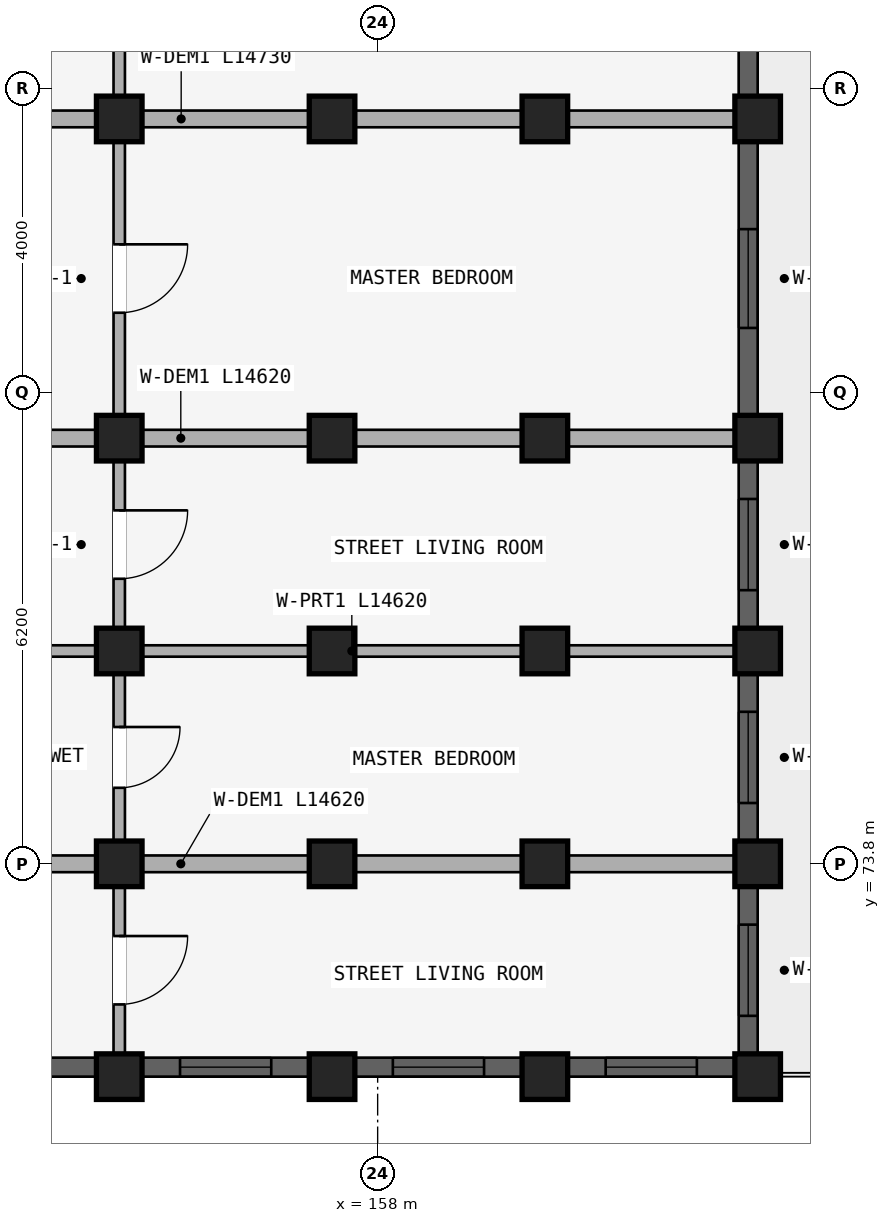
"""IFC4 building model, lengths in metres.
Left out: names, types, materials, properties, quantities, classifications, styles, units other than length and angle.
Written with IfcOpenShell. Run it as: python <this file> out.ifc"""

import sys

from ifc_helpers import new_model, si_unit, direction, frame, frame_2d, origin, origin_2d, place, context, subcontext, project, spatial, rectangle, extrude, element, fill, save


model = new_model("IFC4")
c1 = context("Model", 3, precision=1e-05, world=origin(), true_north=direction((0.0, 1.0)))
c2 = subcontext(c1, "Body", "Model", "MODEL_VIEW")
j1 = project(units=[si_unit("LENGTHUNIT", "METRE"), si_unit("PLANEANGLEUNIT", "RADIAN")], contexts=[c1])
p1 = place(None, origin())
s1 = spatial("IfcSite", under=j1, at=p1, CompositionType="ELEMENT")
p2 = place(p1, origin())
s2 = spatial("IfcBuilding", under=s1, at=p2, CompositionType="ELEMENT")
p3 = place(p2, frame((0.0, 0.0, 30.75)))
s3 = spatial("IfcBuildingStorey", under=s2, at=p3, CompositionType="ELEMENT", Elevation=30.75)
for number, where, z_axis, x_axis in (
    (1, (154.6, 83.6, 0.0), (0.0, 0.0, 1.0), (1.0, 0.0, 0.0)),
    (2, (157.4, 83.6, 0.0), (0.0, 0.0, 1.0), (1.0, 0.0, 0.0)),
    (3, (160.2, 83.6, 0.0), (0.0, 0.0, 1.0), (1.0, 0.0, 0.0)),
):
    element("IfcColumn", number, at=place(p3, frame(where, z_axis=z_axis, x_axis=x_axis)), inside=s3, PredefinedType="COLUMN", context=c2, shape_type="SweptSolid", body=[
        extrude(rectangle(XDim=0.6, YDim=0.6, at=origin_2d()), origin(), (0.0, 0.0, 1.0), 2.93),
    ])
p4 = place(p3, frame((163.0, 83.6, 0.0), z_axis=(0.0, 0.0, 1.0), x_axis=(1.0, 0.0, 0.0)))
e4 = element("IfcColumn", 4, at=p4, inside=s3, PredefinedType="COLUMN", context=c2, shape_type="SweptSolid", body=[
    extrude(rectangle(XDim=0.6, YDim=0.6, at=origin_2d()), origin(), (0.0, 0.0, 1.0), 2.97),
])
for number, where, z_axis, x_axis in (
    (5, (154.6, 79.4, 0.0), (0.0, 0.0, 1.0), (1.0, 0.0, 0.0)),
    (6, (157.4, 79.4, 0.0), (0.0, 0.0, 1.0), (1.0, 0.0, 0.0)),
    (7, (160.2, 79.4, 0.0), (0.0, 0.0, 1.0), (1.0, 0.0, 0.0)),
):
    element("IfcColumn", number, at=place(p3, frame(where, z_axis=z_axis, x_axis=x_axis)), inside=s3, PredefinedType="COLUMN", context=c2, shape_type="SweptSolid", body=[
        extrude(rectangle(XDim=0.6, YDim=0.6, at=origin_2d()), origin(), (0.0, 0.0, 1.0), 2.93),
    ])
p5 = place(p3, frame((163.0, 79.4, 0.0), z_axis=(0.0, 0.0, 1.0), x_axis=(1.0, 0.0, 0.0)))
e8 = element("IfcColumn", 8, at=p5, inside=s3, PredefinedType="COLUMN", context=c2, shape_type="SweptSolid", body=[
    extrude(rectangle(XDim=0.6, YDim=0.6, at=origin_2d()), origin(), (0.0, 0.0, 1.0), 2.97),
])
for number, where, z_axis, x_axis in (
    (9, (154.6, 76.6, 0.0), (0.0, 0.0, 1.0), (1.0, 0.0, 0.0)),
    (10, (157.4, 76.6, 0.0), (0.0, 0.0, 1.0), (1.0, 0.0, 0.0)),
    (11, (160.2, 76.6, 0.0), (0.0, 0.0, 1.0), (1.0, 0.0, 0.0)),
):
    element("IfcColumn", number, at=place(p3, frame(where, z_axis=z_axis, x_axis=x_axis)), inside=s3, PredefinedType="COLUMN", context=c2, shape_type="SweptSolid", body=[
        extrude(rectangle(XDim=0.6, YDim=0.6, at=origin_2d()), origin(), (0.0, 0.0, 1.0), 2.93),
    ])
p6 = place(p3, frame((163.0, 76.6, 0.0), z_axis=(0.0, 0.0, 1.0), x_axis=(1.0, 0.0, 0.0)))
e12 = element("IfcColumn", 12, at=p6, inside=s3, PredefinedType="COLUMN", context=c2, shape_type="SweptSolid", body=[
    extrude(rectangle(XDim=0.6, YDim=0.6, at=origin_2d()), origin(), (0.0, 0.0, 1.0), 2.97),
])
for number, where, z_axis, x_axis in (
    (13, (154.6, 73.8, 0.0), (0.0, 0.0, 1.0), (1.0, 0.0, 0.0)),
    (14, (157.4, 73.8, 0.0), (0.0, 0.0, 1.0), (1.0, 0.0, 0.0)),
    (15, (160.2, 73.8, 0.0), (0.0, 0.0, 1.0), (1.0, 0.0, 0.0)),
):
    element("IfcColumn", number, at=place(p3, frame(where, z_axis=z_axis, x_axis=x_axis)), inside=s3, PredefinedType="COLUMN", context=c2, shape_type="SweptSolid", body=[
        extrude(rectangle(XDim=0.6, YDim=0.6, at=origin_2d()), origin(), (0.0, 0.0, 1.0), 2.93),
    ])
p7 = place(p3, frame((163.0, 73.8, 0.0), z_axis=(0.0, 0.0, 1.0), x_axis=(1.0, 0.0, 0.0)))
e16 = element("IfcColumn", 16, at=p7, inside=s3, PredefinedType="COLUMN", context=c2, shape_type="SweptSolid", body=[
    extrude(rectangle(XDim=0.6, YDim=0.6, at=origin_2d()), origin(), (0.0, 0.0, 1.0), 2.97),
])
for number, where, z_axis, x_axis in (
    (17, (154.6, 71.0, 0.0), (0.0, 0.0, 1.0), (1.0, 0.0, 0.0)),
    (18, (157.4, 71.0, 0.0), (0.0, 0.0, 1.0), (1.0, 0.0, 0.0)),
    (19, (160.2, 71.0, 0.0), (0.0, 0.0, 1.0), (1.0, 0.0, 0.0)),
):
    element("IfcColumn", number, at=place(p3, frame(where, z_axis=z_axis, x_axis=x_axis)), inside=s3, PredefinedType="COLUMN", context=c2, shape_type="SweptSolid", body=[
        extrude(rectangle(XDim=0.6, YDim=0.6, at=origin_2d()), origin(), (0.0, 0.0, 1.0), 2.93),
    ])
p8 = place(p3, frame((163.0, 71.0, 0.0), z_axis=(0.0, 0.0, 1.0), x_axis=(1.0, 0.0, 0.0)))
e20 = element("IfcColumn", 20, at=p8, inside=s3, PredefinedType="COLUMN", context=c2, shape_type="SweptSolid", body=[
    extrude(rectangle(XDim=0.6, YDim=0.6, at=origin_2d()), origin(), (0.0, 0.0, 1.0), 2.97),
])
p9 = place(p3, frame((154.6, 87.57, 0.0), z_axis=(0.0, 0.0, 1.0), x_axis=(0.0, -1.0, 0.0)))
e21 = element("IfcWall", 21, at=p9, inside=s3, PredefinedType="PARTITIONING", context=c2, shape_type="SweptSolid", body=[
    extrude(rectangle(XDim=3.89, YDim=0.15, at=frame_2d((1.945, 0.0))), origin(), (0.0, 0.0, 1.0), 2.372),
])
p10 = place(p9, frame((1.495, 0.0, 0.0)))
e22 = element("IfcOpeningElement", 22, at=p10, cuts=e21, PredefinedType="OPENING", context=c2, shape_type="SweptSolid", body=[
    extrude(rectangle(XDim=0.9, YDim=2.1, at=frame_2d((0.45, 1.05))), frame((0.0, 0.085, 0.0), z_axis=(0.0, -1.0, 0.0), x_axis=(1.0, 0.0, 0.0)), (0.0, 0.0, 1.0), 0.17),
])
p11 = place(p3, frame((154.6, 83.52, 0.0), z_axis=(0.0, 0.0, 1.0), x_axis=(0.0, -1.0, 0.0)))
e23 = element("IfcWall", 23, at=p11, inside=s3, PredefinedType="PARTITIONING", context=c2, shape_type="SweptSolid", body=[
    extrude(rectangle(XDim=4.04, YDim=0.15, at=frame_2d((2.02, 0.0))), origin(), (0.0, 0.0, 1.0), 2.372),
])
p12 = place(p11, frame((1.57, 0.0, 0.0)))
e24 = element("IfcOpeningElement", 24, at=p12, cuts=e23, PredefinedType="OPENING", context=c2, shape_type="SweptSolid", body=[
    extrude(rectangle(XDim=0.9, YDim=2.1, at=frame_2d((0.45, 1.05))), frame((0.0, 0.085, 0.0), z_axis=(0.0, -1.0, 0.0), x_axis=(1.0, 0.0, 0.0)), (0.0, 0.0, 1.0), 0.17),
])
p13 = place(p3, frame((148.05, 83.6, 0.0), z_axis=(0.0, 0.0, 1.0), x_axis=(1.0, 0.0, 0.0)))
e25 = element("IfcWall", 25, at=p13, inside=s3, PredefinedType="STANDARD", context=c2, shape_type="SweptSolid", body=[
    extrude(rectangle(XDim=14.73, YDim=0.22, at=frame_2d((7.365, 0.0))), origin(), (0.0, 0.0, 1.0), 2.372),
])
p14 = place(p3, frame((154.6, 79.32, 0.0), z_axis=(0.0, 0.0, 1.0), x_axis=(0.0, -1.0, 0.0)))
e26 = element("IfcWall", 26, at=p14, inside=s3, PredefinedType="PLUMBINGWALL", context=c2, shape_type="SweptSolid", body=[
    extrude(rectangle(XDim=2.64, YDim=0.15, at=frame_2d((1.32, 0.0))), origin(), (0.0, 0.0, 1.0), 2.372),
])
p15 = place(p14, frame((0.87, 0.0, 0.0)))
e27 = element("IfcOpeningElement", 27, at=p15, cuts=e26, PredefinedType="OPENING", context=c2, shape_type="SweptSolid", body=[
    extrude(rectangle(XDim=0.9, YDim=2.1, at=frame_2d((0.45, 1.05))), frame((0.0, 0.085, 0.0), z_axis=(0.0, -1.0, 0.0), x_axis=(1.0, 0.0, 0.0)), (0.0, 0.0, 1.0), 0.17),
])
p16 = place(p3, frame((148.1, 79.4, 0.0), z_axis=(0.0, 0.0, 1.0), x_axis=(1.0, 0.0, 0.0)))
e28 = element("IfcWall", 28, at=p16, inside=s3, PredefinedType="STANDARD", context=c2, shape_type="SweptSolid", body=[
    extrude(rectangle(XDim=14.62, YDim=0.22, at=frame_2d((7.31, 0.0))), origin(), (0.0, 0.0, 1.0), 2.372),
])
p17 = place(p3, frame((154.6, 76.52, 0.0), z_axis=(0.0, 0.0, 1.0), x_axis=(0.0, -1.0, 0.0)))
e29 = element("IfcWall", 29, at=p17, inside=s3, PredefinedType="PLUMBINGWALL", context=c2, shape_type="SweptSolid", body=[
    extrude(rectangle(XDim=2.64, YDim=0.15, at=frame_2d((1.32, 0.0))), origin(), (0.0, 0.0, 1.0), 2.372),
])
p18 = place(p17, frame((0.92, 0.0, 0.0)))
e30 = element("IfcOpeningElement", 30, at=p18, cuts=e29, PredefinedType="OPENING", context=c2, shape_type="SweptSolid", body=[
    extrude(rectangle(XDim=0.8, YDim=2.1, at=frame_2d((0.4, 1.05))), frame((0.0, 0.085, 0.0), z_axis=(0.0, -1.0, 0.0), x_axis=(1.0, 0.0, 0.0)), (0.0, 0.0, 1.0), 0.17),
])
p19 = place(p3, frame((148.1, 76.6, 0.0), z_axis=(0.0, 0.0, 1.0), x_axis=(1.0, 0.0, 0.0)))
e31 = element("IfcWall", 31, at=p19, inside=s3, PredefinedType="PARTITIONING", context=c2, shape_type="SweptSolid", body=[
    extrude(rectangle(XDim=14.62, YDim=0.15, at=frame_2d((7.31, 0.0))), origin(), (0.0, 0.0, 1.0), 2.372),
])
p20 = place(p19, frame((2.75, 0.0, 0.0)))
e32 = element("IfcOpeningElement", 32, at=p20, cuts=e31, PredefinedType="OPENING", context=c2, shape_type="SweptSolid", body=[
    extrude(rectangle(XDim=0.9, YDim=2.1, at=frame_2d((0.45, 1.05))), frame((0.0, 0.085, 0.0), z_axis=(0.0, -1.0, 0.0), x_axis=(1.0, 0.0, 0.0)), (0.0, 0.0, 1.0), 0.17),
])
p21 = place(p3, frame((154.6, 73.72, 0.0), z_axis=(0.0, 0.0, 1.0), x_axis=(0.0, -1.0, 0.0)))
e33 = element("IfcWall", 33, at=p21, inside=s3, PredefinedType="PLUMBINGWALL", context=c2, shape_type="SweptSolid", body=[
    extrude(rectangle(XDim=2.64, YDim=0.15, at=frame_2d((1.32, 0.0))), origin(), (0.0, 0.0, 1.0), 2.372),
])
p22 = place(p21, frame((0.87, 0.0, 0.0)))
e34 = element("IfcOpeningElement", 34, at=p22, cuts=e33, PredefinedType="OPENING", context=c2, shape_type="SweptSolid", body=[
    extrude(rectangle(XDim=0.9, YDim=2.1, at=frame_2d((0.45, 1.05))), frame((0.0, 0.085, 0.0), z_axis=(0.0, -1.0, 0.0), x_axis=(1.0, 0.0, 0.0)), (0.0, 0.0, 1.0), 0.17),
])
p23 = place(p3, frame((148.1, 73.8, 0.0), z_axis=(0.0, 0.0, 1.0), x_axis=(1.0, 0.0, 0.0)))
e35 = element("IfcWall", 35, at=p23, inside=s3, PredefinedType="STANDARD", context=c2, shape_type="SweptSolid", body=[
    extrude(rectangle(XDim=14.62, YDim=0.22, at=frame_2d((7.31, 0.0))), origin(), (0.0, 0.0, 1.0), 2.372),
])
p24 = place(p3, frame((162.875, 87.497, 0.0), z_axis=(0.0, 0.0, 1.0), x_axis=(0.0, -1.0, 0.0)))
e36 = element("IfcWall", 36, at=p24, inside=s3, PredefinedType="STANDARD", context=c2, shape_type="SweptSolid", body=[
    extrude(rectangle(XDim=3.593, YDim=0.25, at=frame_2d((1.796, 0.0))), origin(), (0.0, 0.0, 1.0), 2.48),
])
p25 = place(p24, frame((1.146, 0.0, 0.88)))
e37 = element("IfcOpeningElement", 37, at=p25, cuts=e36, PredefinedType="OPENING", context=c2, shape_type="SweptSolid", body=[
    extrude(rectangle(XDim=1.3, YDim=1.4, at=frame_2d((0.65, 0.7))), frame((0.0, 0.135, 0.0), z_axis=(0.0, -1.0, 0.0), x_axis=(1.0, 0.0, 0.0)), (0.0, 0.0, 1.0), 0.27),
])
p26 = place(p3, frame((162.875, 83.296, 0.0), z_axis=(0.0, 0.0, 1.0), x_axis=(0.0, -1.0, 0.0)))
e38 = element("IfcWall", 38, at=p26, inside=s3, PredefinedType="STANDARD", context=c2, shape_type="SweptSolid", body=[
    extrude(rectangle(XDim=3.593, YDim=0.25, at=frame_2d((1.796, 0.0))), origin(), (0.0, 0.0, 1.0), 2.48),
])
p27 = place(p26, frame((1.146, 0.0, 0.88)))
e39 = element("IfcOpeningElement", 39, at=p27, cuts=e38, PredefinedType="OPENING", context=c2, shape_type="SweptSolid", body=[
    extrude(rectangle(XDim=1.3, YDim=1.4, at=frame_2d((0.65, 0.7))), frame((0.0, 0.135, 0.0), z_axis=(0.0, -1.0, 0.0), x_axis=(1.0, 0.0, 0.0)), (0.0, 0.0, 1.0), 0.27),
])
p28 = place(p3, frame((162.875, 79.096, 0.0), z_axis=(0.0, 0.0, 1.0), x_axis=(0.0, -1.0, 0.0)))
e40 = element("IfcWall", 40, at=p28, inside=s3, PredefinedType="STANDARD", context=c2, shape_type="SweptSolid", body=[
    extrude(rectangle(XDim=2.193, YDim=0.25, at=frame_2d((1.096, 0.0))), origin(), (0.0, 0.0, 1.0), 2.48),
])
p29 = place(p28, frame((0.497, 0.0, 0.78)))
e41 = element("IfcOpeningElement", 41, at=p29, cuts=e40, PredefinedType="OPENING", context=c2, shape_type="SweptSolid", body=[
    extrude(rectangle(XDim=1.2, YDim=1.5, at=frame_2d((0.6, 0.75))), frame((0.0, 0.135, 0.0), z_axis=(0.0, -1.0, 0.0), x_axis=(1.0, 0.0, 0.0)), (0.0, 0.0, 1.0), 0.27),
])
p30 = place(p3, frame((162.875, 76.296, 0.0), z_axis=(0.0, 0.0, 1.0), x_axis=(0.0, -1.0, 0.0)))
e42 = element("IfcWall", 42, at=p30, inside=s3, PredefinedType="STANDARD", context=c2, shape_type="SweptSolid", body=[
    extrude(rectangle(XDim=2.193, YDim=0.25, at=frame_2d((1.096, 0.0))), origin(), (0.0, 0.0, 1.0), 2.48),
])
p31 = place(p30, frame((0.497, 0.0, 0.78)))
e43 = element("IfcOpeningElement", 43, at=p31, cuts=e42, PredefinedType="OPENING", context=c2, shape_type="SweptSolid", body=[
    extrude(rectangle(XDim=1.2, YDim=1.5, at=frame_2d((0.6, 0.75))), frame((0.0, 0.135, 0.0), z_axis=(0.0, -1.0, 0.0), x_axis=(1.0, 0.0, 0.0)), (0.0, 0.0, 1.0), 0.27),
])
p32 = place(p3, frame((162.875, 73.497, 0.0), z_axis=(0.0, 0.0, 1.0), x_axis=(0.0, -1.0, 0.0)))
e44 = element("IfcWall", 44, at=p32, inside=s3, PredefinedType="STANDARD", context=c2, shape_type="SweptSolid", body=[
    extrude(rectangle(XDim=2.193, YDim=0.25, at=frame_2d((1.097, 0.0))), origin(), (0.0, 0.0, 1.0), 2.48),
])
p33 = place(p32, frame((0.497, 0.0, 0.78)))
e45 = element("IfcOpeningElement", 45, at=p33, cuts=e44, PredefinedType="OPENING", context=c2, shape_type="SweptSolid", body=[
    extrude(rectangle(XDim=1.2, YDim=1.5, at=frame_2d((0.6, 0.75))), frame((0.0, 0.135, 0.0), z_axis=(0.0, -1.0, 0.0), x_axis=(1.0, 0.0, 0.0)), (0.0, 0.0, 1.0), 0.27),
])
p34 = place(p3, frame((148.229, 71.125, 0.0), z_axis=(0.0, 0.0, 1.0), x_axis=(1.0, 0.0, 0.0)))
e46 = element("IfcWall", 46, at=p34, inside=s3, PredefinedType="STANDARD", context=c2, shape_type="SweptSolid", body=[
    extrude(rectangle(XDim=6.068, YDim=0.25, at=frame_2d((3.034, 0.0))), origin(), (0.0, 0.0, 1.0), 2.372),
])
p35 = place(p34, frame((2.322, 0.0, 0.522)))
e47 = element("IfcOpeningElement", 47, at=p35, cuts=e46, PredefinedType="OPENING", context=c2, shape_type="SweptSolid", body=[
    extrude(rectangle(XDim=1.5, YDim=1.65, at=frame_2d((0.75, 0.825))), frame((0.0, 0.135, 0.0), z_axis=(0.0, -1.0, 0.0), x_axis=(1.0, 0.0, 0.0)), (0.0, 0.0, 1.0), 0.27),
])
p36 = place(p3, frame((154.904, 71.125, 0.0), z_axis=(0.0, 0.0, 1.0), x_axis=(1.0, 0.0, 0.0)))
e48 = element("IfcWall", 48, at=p36, inside=s3, PredefinedType="STANDARD", context=c2, shape_type="SweptSolid", body=[
    extrude(rectangle(XDim=2.193, YDim=0.25, at=frame_2d((1.096, 0.0))), origin(), (0.0, 0.0, 1.0), 2.372),
])
p37 = place(p36, frame((0.497, 0.0, 0.672)))
e49 = element("IfcOpeningElement", 49, at=p37, cuts=e48, PredefinedType="OPENING", context=c2, shape_type="SweptSolid", body=[
    extrude(rectangle(XDim=1.2, YDim=1.5, at=frame_2d((0.6, 0.75))), frame((0.0, 0.135, 0.0), z_axis=(0.0, -1.0, 0.0), x_axis=(1.0, 0.0, 0.0)), (0.0, 0.0, 1.0), 0.27),
])
p38 = place(p3, frame((157.704, 71.125, 0.0), z_axis=(0.0, 0.0, 1.0), x_axis=(1.0, 0.0, 0.0)))
e50 = element("IfcWall", 50, at=p38, inside=s3, PredefinedType="STANDARD", context=c2, shape_type="SweptSolid", body=[
    extrude(rectangle(XDim=2.193, YDim=0.25, at=frame_2d((1.096, 0.0))), origin(), (0.0, 0.0, 1.0), 2.372),
])
p39 = place(p38, frame((0.497, 0.0, 0.672)))
e51 = element("IfcOpeningElement", 51, at=p39, cuts=e50, PredefinedType="OPENING", context=c2, shape_type="SweptSolid", body=[
    extrude(rectangle(XDim=1.2, YDim=1.5, at=frame_2d((0.6, 0.75))), frame((0.0, 0.135, 0.0), z_axis=(0.0, -1.0, 0.0), x_axis=(1.0, 0.0, 0.0)), (0.0, 0.0, 1.0), 0.27),
])
p40 = place(p3, frame((160.503, 71.125, 0.0), z_axis=(0.0, 0.0, 1.0), x_axis=(1.0, 0.0, 0.0)))
e52 = element("IfcWall", 52, at=p40, inside=s3, PredefinedType="STANDARD", context=c2, shape_type="SweptSolid", body=[
    extrude(rectangle(XDim=2.193, YDim=0.25, at=frame_2d((1.097, 0.0))), origin(), (0.0, 0.0, 1.0), 2.412),
])
p41 = place(p40, frame((0.497, 0.0, 0.712)))
e53 = element("IfcOpeningElement", 53, at=p41, cuts=e52, PredefinedType="OPENING", context=c2, shape_type="SweptSolid", body=[
    extrude(rectangle(XDim=1.2, YDim=1.5, at=frame_2d((0.6, 0.75))), frame((0.0, 0.135, 0.0), z_axis=(0.0, -1.0, 0.0), x_axis=(1.0, 0.0, 0.0)), (0.0, 0.0, 1.0), 0.27),
])
p42 = place(p27, origin())
e54 = element("IfcWindow", 54, at=p42, inside=s3, PartitioningType="DOUBLE_PANEL_HORIZONTAL", PredefinedType="WINDOW", context=c2, shape_type="SweptSolid", body=[
    extrude(rectangle(XDim=1.3, YDim=1.4, at=frame_2d((0.65, 0.7))), frame((0.0, 0.03, 0.0), z_axis=(0.0, -1.0, 0.0), x_axis=(1.0, 0.0, 0.0)), (0.0, 0.0, 1.0), 0.06),
])
fill(e39, e54)
p43 = place(p29, origin())
e55 = element("IfcWindow", 55, at=p43, inside=s3, PartitioningType="SINGLE_PANEL", PredefinedType="WINDOW", context=c2, shape_type="SweptSolid", body=[
    extrude(rectangle(XDim=1.2, YDim=1.5, at=frame_2d((0.6, 0.75))), frame((0.0, 0.03, 0.0), z_axis=(0.0, -1.0, 0.0), x_axis=(1.0, 0.0, 0.0)), (0.0, 0.0, 1.0), 0.06),
])
fill(e41, e55)
p44 = place(p31, origin())
e56 = element("IfcWindow", 56, at=p44, inside=s3, PartitioningType="SINGLE_PANEL", PredefinedType="WINDOW", context=c2, shape_type="SweptSolid", body=[
    extrude(rectangle(XDim=1.2, YDim=1.5, at=frame_2d((0.6, 0.75))), frame((0.0, 0.03, 0.0), z_axis=(0.0, -1.0, 0.0), x_axis=(1.0, 0.0, 0.0)), (0.0, 0.0, 1.0), 0.06),
])
fill(e43, e56)
p45 = place(p33, origin())
e57 = element("IfcWindow", 57, at=p45, inside=s3, PartitioningType="SINGLE_PANEL", PredefinedType="WINDOW", context=c2, shape_type="SweptSolid", body=[
    extrude(rectangle(XDim=1.2, YDim=1.5, at=frame_2d((0.6, 0.75))), frame((0.0, 0.03, 0.0), z_axis=(0.0, -1.0, 0.0), x_axis=(1.0, 0.0, 0.0)), (0.0, 0.0, 1.0), 0.06),
])
fill(e45, e57)
p46 = place(p37, origin())
e58 = element("IfcWindow", 58, at=p46, inside=s3, PartitioningType="SINGLE_PANEL", PredefinedType="WINDOW", context=c2, shape_type="SweptSolid", body=[
    extrude(rectangle(XDim=1.2, YDim=1.5, at=frame_2d((0.6, 0.75))), frame((0.0, 0.03, 0.0), z_axis=(0.0, -1.0, 0.0), x_axis=(1.0, 0.0, 0.0)), (0.0, 0.0, 1.0), 0.06),
])
fill(e49, e58)
p47 = place(p39, origin())
e59 = element("IfcWindow", 59, at=p47, inside=s3, PartitioningType="SINGLE_PANEL", PredefinedType="WINDOW", context=c2, shape_type="SweptSolid", body=[
    extrude(rectangle(XDim=1.2, YDim=1.5, at=frame_2d((0.6, 0.75))), frame((0.0, 0.03, 0.0), z_axis=(0.0, -1.0, 0.0), x_axis=(1.0, 0.0, 0.0)), (0.0, 0.0, 1.0), 0.06),
])
fill(e51, e59)
p48 = place(p41, origin())
e60 = element("IfcWindow", 60, at=p48, inside=s3, PartitioningType="SINGLE_PANEL", PredefinedType="WINDOW", context=c2, shape_type="SweptSolid", body=[
    extrude(rectangle(XDim=1.2, YDim=1.5, at=frame_2d((0.6, 0.75))), frame((0.0, 0.03, 0.0), z_axis=(0.0, -1.0, 0.0), x_axis=(1.0, 0.0, 0.0)), (0.0, 0.0, 1.0), 0.06),
])
fill(e53, e60)
p49 = place(p12, origin())
e61 = element("IfcDoor", 61, at=p49, inside=s3, OperationType="SINGLE_SWING_LEFT", PredefinedType="DOOR", context=c2, shape_type="SweptSolid", body=[
    extrude(rectangle(XDim=0.9, YDim=2.1, at=frame_2d((0.45, 1.05))), frame((0.0, 0.025, 0.0), z_axis=(0.0, -1.0, 0.0), x_axis=(1.0, 0.0, 0.0)), (0.0, 0.0, 1.0), 0.05),
])
fill(e24, e61)
p50 = place(p15, origin())
e62 = element("IfcDoor", 62, at=p50, inside=s3, OperationType="SINGLE_SWING_LEFT", PredefinedType="DOOR", context=c2, shape_type="SweptSolid", body=[
    extrude(rectangle(XDim=0.9, YDim=2.1, at=frame_2d((0.45, 1.05))), frame((0.0, 0.025, 0.0), z_axis=(0.0, -1.0, 0.0), x_axis=(1.0, 0.0, 0.0)), (0.0, 0.0, 1.0), 0.05),
])
fill(e27, e62)
p51 = place(p18, origin())
e63 = element("IfcDoor", 63, at=p51, inside=s3, OperationType="SINGLE_SWING_LEFT", PredefinedType="DOOR", context=c2, shape_type="SweptSolid", body=[
    extrude(rectangle(XDim=0.8, YDim=2.1, at=frame_2d((0.4, 1.05))), frame((0.0, 0.025, 0.0), z_axis=(0.0, -1.0, 0.0), x_axis=(1.0, 0.0, 0.0)), (0.0, 0.0, 1.0), 0.05),
])
fill(e30, e63)
p52 = place(p22, origin())
e64 = element("IfcDoor", 64, at=p52, inside=s3, OperationType="SINGLE_SWING_LEFT", PredefinedType="DOOR", context=c2, shape_type="SweptSolid", body=[
    extrude(rectangle(XDim=0.9, YDim=2.1, at=frame_2d((0.45, 1.05))), frame((0.0, 0.025, 0.0), z_axis=(0.0, -1.0, 0.0), x_axis=(1.0, 0.0, 0.0)), (0.0, 0.0, 1.0), 0.05),
])
fill(e34, e64)
save(model, sys.argv[1])
